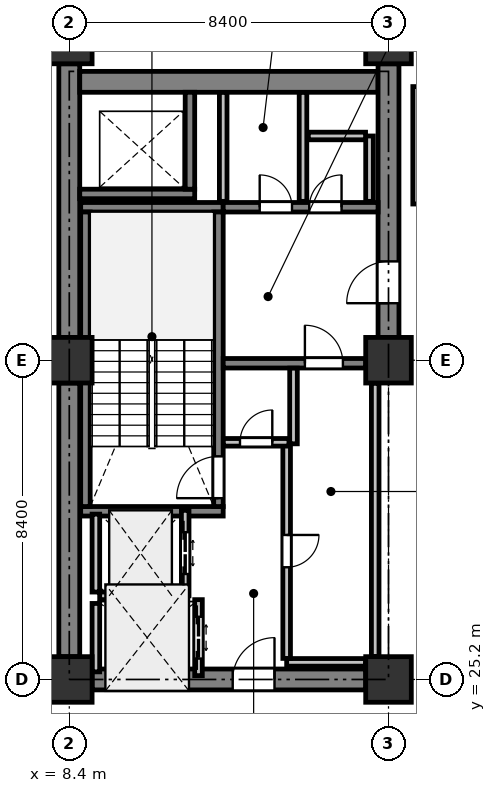
"""IFC4 building model, lengths in metres.
Left out: names, types, materials, properties, quantities, classifications, styles, units other than length and angle.
Written with IfcOpenShell. Run it as: python <this file> out.ifc"""

import sys

from ifc_helpers import new_model, si_unit, direction, frame, frame_2d, origin, origin_2d, place, context, subcontext, project, spatial, rectangle, extrude, element, fill, save


model = new_model("IFC4")
c1 = context("Model", 3, precision=1e-05, world=origin(), true_north=direction((0.0, 1.0)))
c2 = subcontext(c1, "Body", "Model", "MODEL_VIEW")
j1 = project(units=[si_unit("LENGTHUNIT", "METRE"), si_unit("PLANEANGLEUNIT", "RADIAN")], contexts=[c1])
p1 = place(None, origin())
s1 = spatial("IfcSite", under=j1, at=p1, CompositionType="ELEMENT")
p2 = place(p1, origin())
s2 = spatial("IfcBuilding", under=s1, at=p2, CompositionType="ELEMENT")
p3 = place(p2, frame((0.0, 0.0, 141.8)))
s3 = spatial("IfcBuildingStorey", under=s2, at=p3, CompositionType="ELEMENT", Elevation=141.8)
for number, where, z_axis, x_axis in (
    (1, (8.4, 25.2, 0.0), (0.0, 0.0, 1.0), (1.0, 0.0, 0.0)),
    (2, (8.4, 33.6, 0.0), (0.0, 0.0, 1.0), (1.0, 0.0, 0.0)),
    (3, (8.4, 42.0, 0.0), (0.0, 0.0, 1.0), (1.0, 0.0, 0.0)),
    (4, (16.8, 25.2, 0.0), (0.0, 0.0, 1.0), (1.0, 0.0, 0.0)),
    (5, (16.8, 33.6, 0.0), (0.0, 0.0, 1.0), (1.0, 0.0, 0.0)),
    (6, (16.8, 42.0, 0.0), (0.0, 0.0, 1.0), (1.0, 0.0, 0.0)),
):
    element("IfcColumn", number, at=place(p3, frame(where, z_axis=z_axis, x_axis=x_axis)), inside=s3, PredefinedType="COLUMN", context=c2, shape_type="SweptSolid", body=[
        extrude(rectangle(XDim=1.2, YDim=1.2, at=origin_2d()), origin(), (0.0, 0.0, 1.0), 4.1),
    ])
for number, where, z_axis, x_axis in (
    (7, (8.4, 25.8, 0.0), (0.0, 0.0, 1.0), (0.0, 1.0, 0.0)),
    (8, (8.4, 34.2, 0.0), (0.0, 0.0, 1.0), (0.0, 1.0, 0.0)),
):
    element("IfcWall", number, at=place(p3, frame(where, z_axis=z_axis, x_axis=x_axis)), inside=s3, PredefinedType="SHEAR", context=c2, shape_type="SweptSolid", body=[
        extrude(rectangle(XDim=7.2, YDim=0.55, at=frame_2d((3.6, 0.0))), origin(), (0.0, 0.0, 1.0), 3.825),
    ])
p4 = place(p3, frame((8.675, 40.925, 0.0), z_axis=(0.0, 0.0, 1.0), x_axis=(1.0, 0.0, 0.0)))
e9 = element("IfcWall", 9, at=p4, inside=s3, PredefinedType="SHEAR", context=c2, shape_type="SweptSolid", body=[
    extrude(rectangle(XDim=7.85, YDim=0.55, at=frame_2d((3.925, 0.0))), origin(), (0.0, 0.0, 1.0), 3.825),
])
p5 = place(p3, frame((16.8, 34.2, 0.0), z_axis=(0.0, 0.0, 1.0), x_axis=(0.0, 1.0, 0.0)))
e10 = element("IfcWall", 10, at=p5, inside=s3, PredefinedType="SHEAR", context=c2, shape_type="SweptSolid", body=[
    extrude(rectangle(XDim=7.2, YDim=0.55, at=frame_2d((3.6, 0.0))), origin(), (0.0, 0.0, 1.0), 3.825),
])
p6 = place(p5, frame((0.9, 0.0, 0.0)))
e11 = element("IfcOpeningElement", 11, at=p6, cuts=e10, PredefinedType="OPENING", context=c2, shape_type="SweptSolid", body=[
    extrude(rectangle(XDim=1.1, YDim=2.15, at=frame_2d((0.55, 1.075))), frame((0.0, 0.285, 0.0), z_axis=(0.0, -1.0, 0.0), x_axis=(1.0, 0.0, 0.0)), (0.0, 0.0, 1.0), 0.57),
])
p7 = place(p3, frame((9.0, 25.2, 0.0), z_axis=(0.0, 0.0, 1.0), x_axis=(1.0, 0.0, 0.0)))
e12 = element("IfcWall", 12, at=p7, inside=s3, PredefinedType="SHEAR", context=c2, shape_type="SweptSolid", body=[
    extrude(rectangle(XDim=7.2, YDim=0.55, at=frame_2d((3.6, 0.0))), origin(), (0.0, 0.0, 1.0), 3.825),
])
p8 = place(p7, frame((3.7, 0.0, 0.0)))
e13 = element("IfcOpeningElement", 13, at=p8, cuts=e12, PredefinedType="OPENING", context=c2, shape_type="SweptSolid", body=[
    extrude(rectangle(XDim=1.1, YDim=2.15, at=frame_2d((0.55, 1.075))), frame((0.0, 0.285, 0.0), z_axis=(0.0, -1.0, 0.0), x_axis=(1.0, 0.0, 0.0)), (0.0, 0.0, 1.0), 0.57),
])
for number, where, z_axis, x_axis in (
    (14, (12.45, 29.625, 0.0), (0.0, 0.0, 1.0), (-1.0, 0.0, 0.0)),
    (15, (12.45, 37.625, 0.0), (0.0, 0.0, 1.0), (-1.0, 0.0, 0.0)),
):
    element("IfcWall", number, at=place(p3, frame(where, z_axis=z_axis, x_axis=x_axis)), inside=s3, PredefinedType="SHEAR", context=c2, shape_type="SweptSolid", body=[
        extrude(rectangle(XDim=3.75, YDim=0.25, at=frame_2d((1.875, 0.0))), origin(), (0.0, 0.0, 1.0), 3.825),
    ])
p9 = place(p3, frame((12.325, 29.75, 0.0), z_axis=(0.0, 0.0, 1.0), x_axis=(0.0, 1.0, 0.0)))
e16 = element("IfcWall", 16, at=p9, inside=s3, PredefinedType="SHEAR", context=c2, shape_type="SweptSolid", body=[
    extrude(rectangle(XDim=7.75, YDim=0.25, at=frame_2d((3.875, 0.0))), origin(), (0.0, 0.0, 1.0), 3.825),
])
p10 = place(p9, frame((0.22, 0.0, 0.0)))
e17 = element("IfcOpeningElement", 17, at=p10, cuts=e16, PredefinedType="OPENING", context=c2, shape_type="SweptSolid", body=[
    extrude(rectangle(XDim=1.1, YDim=2.15, at=frame_2d((0.55, 1.075))), frame((0.0, 0.135, 0.0), z_axis=(0.0, -1.0, 0.0), x_axis=(1.0, 0.0, 0.0)), (0.0, 0.0, 1.0), 0.27),
])
p11 = place(p3, frame((8.825, 29.75, 0.0), z_axis=(0.0, 0.0, 1.0), x_axis=(0.0, 1.0, 0.0)))
e18 = element("IfcWall", 18, at=p11, inside=s3, PredefinedType="SHEAR", context=c2, shape_type="SweptSolid", body=[
    extrude(rectangle(XDim=7.75, YDim=0.25, at=frame_2d((3.875, 0.0))), origin(), (0.0, 0.0, 1.0), 3.825),
])
p12 = place(p3, frame((8.675, 37.975, 0.0), z_axis=(0.0, 0.0, 1.0), x_axis=(1.0, 0.0, 0.0)))
e19 = element("IfcWall", 19, at=p12, inside=s3, PredefinedType="SHEAR", context=c2, shape_type="SweptSolid", body=[
    extrude(rectangle(XDim=3.025, YDim=0.25, at=frame_2d((1.512, 0.0))), origin(), (0.0, 0.0, 1.0), 3.825),
])
p13 = place(p3, frame((11.575, 38.1, 0.0), z_axis=(0.0, 0.0, 1.0), x_axis=(0.0, 1.0, 0.0)))
e20 = element("IfcWall", 20, at=p13, inside=s3, PredefinedType="SHEAR", context=c2, shape_type="SweptSolid", body=[
    extrude(rectangle(XDim=2.55, YDim=0.25, at=frame_2d((1.275, 0.0))), origin(), (0.0, 0.0, 1.0), 3.825),
])
p14 = place(p3, frame((12.45, 33.52, 0.0), z_axis=(0.0, 0.0, 1.0), x_axis=(1.0, 0.0, 0.0)))
e21 = element("IfcWall", 21, at=p14, inside=s3, PredefinedType="SHEAR", context=c2, shape_type="SweptSolid", body=[
    extrude(rectangle(XDim=3.75, YDim=0.25, at=frame_2d((1.875, 0.0))), origin(), (0.0, 0.0, 1.0), 3.825),
])
p15 = place(p14, frame((2.15, 0.0, 0.0)))
e22 = element("IfcOpeningElement", 22, at=p15, cuts=e21, PredefinedType="OPENING", context=c2, shape_type="SweptSolid", body=[
    extrude(rectangle(XDim=1.0, YDim=2.15, at=frame_2d((0.5, 1.075))), frame((0.0, 0.135, 0.0), z_axis=(0.0, -1.0, 0.0), x_axis=(1.0, 0.0, 0.0)), (0.0, 0.0, 1.0), 0.27),
])
p16 = place(p3, frame((12.45, 37.625, 0.0), z_axis=(0.0, 0.0, 1.0), x_axis=(1.0, 0.0, 0.0)))
e23 = element("IfcWall", 23, at=p16, inside=s3, PredefinedType="SHEAR", context=c2, shape_type="SweptSolid", body=[
    extrude(rectangle(XDim=4.075, YDim=0.25, at=frame_2d((2.038, 0.0))), origin(), (0.0, 0.0, 1.0), 3.825),
])
p17 = place(p16, frame((0.96, 0.0, 0.0)))
e24 = element("IfcOpeningElement", 24, at=p17, cuts=e23, PredefinedType="OPENING", context=c2, shape_type="SweptSolid", body=[
    extrude(rectangle(XDim=0.85, YDim=2.15, at=frame_2d((0.425, 1.075))), frame((0.0, 0.135, 0.0), z_axis=(0.0, -1.0, 0.0), x_axis=(1.0, 0.0, 0.0)), (0.0, 0.0, 1.0), 0.27),
])
p18 = place(p16, frame((2.264, 0.0, 0.0)))
e25 = element("IfcOpeningElement", 25, at=p18, cuts=e23, PredefinedType="OPENING", context=c2, shape_type="SweptSolid", body=[
    extrude(rectangle(XDim=0.85, YDim=2.15, at=frame_2d((0.425, 1.075))), frame((0.0, 0.135, 0.0), z_axis=(0.0, -1.0, 0.0), x_axis=(1.0, 0.0, 0.0)), (0.0, 0.0, 1.0), 0.27),
])
p19 = place(p3, frame((11.45, 27.4, 0.0), z_axis=(0.0, 0.0, 1.0), x_axis=(0.0, 1.0, 0.0)))
e26 = element("IfcWall", 26, at=p19, inside=s3, PredefinedType="PARTITIONING", context=c2, shape_type="SweptSolid", body=[
    extrude(rectangle(XDim=2.25, YDim=0.2, at=frame_2d((1.125, 0.0))), origin(), (0.0, 0.0, 1.0), 3.825),
])
p20 = place(p19, frame((0.575, 0.0, 0.0)))
e27 = element("IfcOpeningElement", 27, at=p20, cuts=e26, PredefinedType="OPENING", context=c2, shape_type="SweptSolid", body=[
    extrude(rectangle(XDim=1.1, YDim=2.2, at=frame_2d((0.55, 1.1))), frame((0.0, 0.11, 0.0), z_axis=(0.0, -1.0, 0.0), x_axis=(1.0, 0.0, 0.0)), (0.0, 0.0, 1.0), 0.22),
])
p21 = place(p3, frame((9.1, 27.5, 0.0), z_axis=(0.0, 0.0, 1.0), x_axis=(0.0, 1.0, 0.0)))
e28 = element("IfcWall", 28, at=p21, inside=s3, PredefinedType="PARTITIONING", context=c2, shape_type="SweptSolid", body=[
    extrude(rectangle(XDim=2.05, YDim=0.2, at=frame_2d((1.025, 0.0))), origin(), (0.0, 0.0, 1.0), 3.825),
])
p22 = place(p3, frame((9.2, 27.4, 0.0), z_axis=(0.0, 0.0, 1.0), x_axis=(1.0, 0.0, 0.0)))
e29 = element("IfcWall", 29, at=p22, inside=s3, PredefinedType="PARTITIONING", context=c2, shape_type="SweptSolid", body=[
    extrude(rectangle(XDim=2.15, YDim=0.2, at=frame_2d((1.075, 0.0))), origin(), (0.0, 0.0, 1.0), 3.825),
])
p23 = place(p3, frame((11.8, 25.3, 0.0), z_axis=(0.0, 0.0, 1.0), x_axis=(0.0, 1.0, 0.0)))
e30 = element("IfcWall", 30, at=p23, inside=s3, PredefinedType="PARTITIONING", context=c2, shape_type="SweptSolid", body=[
    extrude(rectangle(XDim=2.0, YDim=0.2, at=frame_2d((1.0, 0.0))), origin(), (0.0, 0.0, 1.0), 3.825),
])
p24 = place(p23, frame((0.45, 0.0, 0.0)))
e31 = element("IfcOpeningElement", 31, at=p24, cuts=e30, PredefinedType="OPENING", context=c2, shape_type="SweptSolid", body=[
    extrude(rectangle(XDim=1.1, YDim=2.2, at=frame_2d((0.55, 1.1))), frame((0.0, 0.11, 0.0), z_axis=(0.0, -1.0, 0.0), x_axis=(1.0, 0.0, 0.0)), (0.0, 0.0, 1.0), 0.22),
])
p25 = place(p3, frame((9.1, 25.4, 0.0), z_axis=(0.0, 0.0, 1.0), x_axis=(0.0, 1.0, 0.0)))
e32 = element("IfcWall", 32, at=p25, inside=s3, PredefinedType="PARTITIONING", context=c2, shape_type="SweptSolid", body=[
    extrude(rectangle(XDim=1.8, YDim=0.2, at=frame_2d((0.9, 0.0))), origin(), (0.0, 0.0, 1.0), 3.825),
])
p26 = place(p3, frame((14.12, 25.65, 0.0), z_axis=(0.0, 0.0, 1.0), x_axis=(1.0, 0.0, 0.0)))
e33 = element("IfcWall", 33, at=p26, inside=s3, PredefinedType="PARTITIONING", context=c2, shape_type="SweptSolid", body=[
    extrude(rectangle(XDim=2.075, YDim=0.2, at=frame_2d((1.038, 0.0))), origin(), (0.0, 0.0, 1.0), 3.825),
])
p27 = place(p3, frame((16.45, 25.805, 0.0), z_axis=(0.0, 0.0, 1.0), x_axis=(0.0, 1.0, 0.0)))
e34 = element("IfcWall", 34, at=p27, inside=s3, PredefinedType="PARTITIONING", context=c2, shape_type="SweptSolid", body=[
    extrude(rectangle(XDim=7.19, YDim=0.2, at=frame_2d((3.595, 0.0))), origin(), (0.0, 0.0, 1.0), 3.825),
])
p28 = place(p3, frame((14.3, 33.391, 0.0), z_axis=(0.0, 0.0, 1.0), x_axis=(0.0, -1.0, 0.0)))
e35 = element("IfcWall", 35, at=p28, inside=s3, PredefinedType="PARTITIONING", context=c2, shape_type="SweptSolid", body=[
    extrude(rectangle(XDim=1.991, YDim=0.2, at=frame_2d((0.996, 0.0))), origin(), (0.0, 0.0, 1.0), 3.825),
])
p29 = place(p3, frame((14.12, 31.4, 0.0), z_axis=(0.0, 0.0, 1.0), x_axis=(0.0, -1.0, 0.0)))
e36 = element("IfcWall", 36, at=p29, inside=s3, PredefinedType="PARTITIONING", context=c2, shape_type="SweptSolid", body=[
    extrude(rectangle(XDim=5.646, YDim=0.2, at=frame_2d((2.823, 0.0))), origin(), (0.0, 0.0, 1.0), 3.825),
])
p30 = place(p29, frame((2.398, 0.0, 0.0)))
e37 = element("IfcOpeningElement", 37, at=p30, cuts=e36, PredefinedType="OPENING", context=c2, shape_type="SweptSolid", body=[
    extrude(rectangle(XDim=0.85, YDim=2.15, at=frame_2d((0.425, 1.075))), frame((0.0, 0.11, 0.0), z_axis=(0.0, -1.0, 0.0), x_axis=(1.0, 0.0, 0.0)), (0.0, 0.0, 1.0), 0.22),
])
p31 = place(p3, frame((12.454, 31.44, 0.0), z_axis=(0.0, 0.0, 1.0), x_axis=(1.0, 0.0, 0.0)))
e38 = element("IfcWall", 38, at=p31, inside=s3, PredefinedType="PARTITIONING", context=c2, shape_type="SweptSolid", body=[
    extrude(rectangle(XDim=1.726, YDim=0.2, at=frame_2d((0.863, 0.0))), origin(), (0.0, 0.0, 1.0), 3.825),
])
p32 = place(p31, frame((0.438, 0.0, 0.0)))
e39 = element("IfcOpeningElement", 39, at=p32, cuts=e38, PredefinedType="OPENING", context=c2, shape_type="SweptSolid", body=[
    extrude(rectangle(XDim=0.85, YDim=2.15, at=frame_2d((0.425, 1.075))), frame((0.0, 0.11, 0.0), z_axis=(0.0, -1.0, 0.0), x_axis=(1.0, 0.0, 0.0)), (0.0, 0.0, 1.0), 0.22),
])
for number, where, z_axis, x_axis in (
    (40, (14.55, 37.78, 0.0), (0.0, 0.0, 1.0), (0.0, 1.0, 0.0)),
    (41, (12.45, 40.646, 0.0), (0.0, 0.0, 1.0), (0.0, -1.0, 0.0)),
):
    element("IfcWall", number, at=place(p3, frame(where, z_axis=z_axis, x_axis=x_axis)), inside=s3, PredefinedType="PARTITIONING", context=c2, shape_type="SweptSolid", body=[
        extrude(rectangle(XDim=2.866, YDim=0.2, at=frame_2d((1.433, 0.0))), origin(), (0.0, 0.0, 1.0), 2.725),
    ])
p33 = place(p3, frame((16.3, 37.78, 0.0), z_axis=(0.0, 0.0, 1.0), x_axis=(0.0, 1.0, 0.0)))
e42 = element("IfcWall", 42, at=p33, inside=s3, PredefinedType="PARTITIONING", context=c2, shape_type="SweptSolid", body=[
    extrude(rectangle(XDim=1.72, YDim=0.2, at=frame_2d((0.86, 0.0))), origin(), (0.0, 0.0, 1.0), 2.725),
])
p34 = place(p3, frame((16.196, 39.5, 0.0), z_axis=(0.0, 0.0, 1.0), x_axis=(-1.0, 0.0, 0.0)))
e43 = element("IfcWall", 43, at=p34, inside=s3, PredefinedType="PARTITIONING", context=c2, shape_type="SweptSolid", body=[
    extrude(rectangle(XDim=1.506, YDim=0.2, at=frame_2d((0.753, 0.0))), origin(), (0.0, 0.0, 1.0), 2.725),
])
p35 = place(p3, frame((17.54, 37.71, 0.0), z_axis=(0.0, 0.0, 1.0), x_axis=(0.0, 1.0, 0.0)))
e44 = element("IfcWall", 44, at=p35, inside=s3, PredefinedType="PARTITIONING", context=c2, shape_type="SweptSolid", body=[
    extrude(rectangle(XDim=3.09, YDim=0.2, at=frame_2d((1.545, 0.0))), origin(), (0.0, 0.0, 1.0), 3.825),
])
p36 = place(p6, origin())
e45 = element("IfcDoor", 45, at=p36, inside=s3, OperationType="SINGLE_SWING_LEFT", PredefinedType="DOOR", context=c2, shape_type="SweptSolid", body=[
    extrude(rectangle(XDim=1.1, YDim=2.15, at=frame_2d((0.55, 1.075))), frame((0.0, 0.025, 0.0), z_axis=(0.0, -1.0, 0.0), x_axis=(1.0, 0.0, 0.0)), (0.0, 0.0, 1.0), 0.05),
])
fill(e11, e45)
p37 = place(p8, origin())
e46 = element("IfcDoor", 46, at=p37, inside=s3, OperationType="SINGLE_SWING_RIGHT", PredefinedType="DOOR", context=c2, shape_type="SweptSolid", body=[
    extrude(rectangle(XDim=1.1, YDim=2.15, at=frame_2d((0.55, 1.075))), frame((0.0, 0.025, 0.0), z_axis=(0.0, -1.0, 0.0), x_axis=(1.0, 0.0, 0.0)), (0.0, 0.0, 1.0), 0.05),
])
fill(e13, e46)
p38 = place(p10, origin())
e47 = element("IfcDoor", 47, at=p38, inside=s3, OperationType="SINGLE_SWING_LEFT", PredefinedType="DOOR", context=c2, shape_type="SweptSolid", body=[
    extrude(rectangle(XDim=1.1, YDim=2.15, at=frame_2d((0.55, 1.075))), frame((0.0, 0.025, 0.0), z_axis=(0.0, -1.0, 0.0), x_axis=(1.0, 0.0, 0.0)), (0.0, 0.0, 1.0), 0.05),
])
fill(e17, e47)
p39 = place(p15, origin())
e48 = element("IfcDoor", 48, at=p39, inside=s3, OperationType="SINGLE_SWING_LEFT", PredefinedType="DOOR", context=c2, shape_type="SweptSolid", body=[
    extrude(rectangle(XDim=1.0, YDim=2.15, at=frame_2d((0.5, 1.075))), frame((0.0, 0.025, 0.0), z_axis=(0.0, -1.0, 0.0), x_axis=(1.0, 0.0, 0.0)), (0.0, 0.0, 1.0), 0.05),
])
fill(e22, e48)
p40 = place(p20, origin())
e49 = element("IfcDoor", 49, at=p40, inside=s3, OperationType="DOUBLE_DOOR_SLIDING", PredefinedType="DOOR", context=c2, shape_type="SweptSolid", body=[
    extrude(rectangle(XDim=1.1, YDim=2.2, at=frame_2d((0.55, 1.1))), frame((0.0, 0.025, 0.0), z_axis=(0.0, -1.0, 0.0), x_axis=(1.0, 0.0, 0.0)), (0.0, 0.0, 1.0), 0.05),
])
fill(e27, e49)
p41 = place(p24, origin())
e50 = element("IfcDoor", 50, at=p41, inside=s3, OperationType="DOUBLE_DOOR_SLIDING", PredefinedType="DOOR", context=c2, shape_type="SweptSolid", body=[
    extrude(rectangle(XDim=1.1, YDim=2.2, at=frame_2d((0.55, 1.1))), frame((0.0, 0.025, 0.0), z_axis=(0.0, -1.0, 0.0), x_axis=(1.0, 0.0, 0.0)), (0.0, 0.0, 1.0), 0.05),
])
fill(e31, e50)
p42 = place(p30, origin())
e51 = element("IfcDoor", 51, at=p42, inside=s3, OperationType="SINGLE_SWING_LEFT", PredefinedType="DOOR", context=c2, shape_type="SweptSolid", body=[
    extrude(rectangle(XDim=0.85, YDim=2.15, at=frame_2d((0.425, 1.075))), frame((0.0, 0.025, 0.0), z_axis=(0.0, -1.0, 0.0), x_axis=(1.0, 0.0, 0.0)), (0.0, 0.0, 1.0), 0.05),
])
fill(e37, e51)
p43 = place(p32, origin())
e52 = element("IfcDoor", 52, at=p43, inside=s3, OperationType="SINGLE_SWING_RIGHT", PredefinedType="DOOR", context=c2, shape_type="SweptSolid", body=[
    extrude(rectangle(XDim=0.85, YDim=2.15, at=frame_2d((0.425, 1.075))), frame((0.0, 0.025, 0.0), z_axis=(0.0, -1.0, 0.0), x_axis=(1.0, 0.0, 0.0)), (0.0, 0.0, 1.0), 0.05),
])
fill(e39, e52)
p44 = place(p17, origin())
e53 = element("IfcDoor", 53, at=p44, inside=s3, OperationType="SINGLE_SWING_LEFT", PredefinedType="DOOR", context=c2, shape_type="SweptSolid", body=[
    extrude(rectangle(XDim=0.85, YDim=2.15, at=frame_2d((0.425, 1.075))), frame((0.0, 0.025, 0.0), z_axis=(0.0, -1.0, 0.0), x_axis=(1.0, 0.0, 0.0)), (0.0, 0.0, 1.0), 0.05),
])
fill(e24, e53)
p45 = place(p18, origin())
e54 = element("IfcDoor", 54, at=p45, inside=s3, OperationType="SINGLE_SWING_RIGHT", PredefinedType="DOOR", context=c2, shape_type="SweptSolid", body=[
    extrude(rectangle(XDim=0.85, YDim=2.15, at=frame_2d((0.425, 1.075))), frame((0.0, 0.025, 0.0), z_axis=(0.0, -1.0, 0.0), x_axis=(1.0, 0.0, 0.0)), (0.0, 0.0, 1.0), 0.05),
])
fill(e25, e54)
save(model, sys.argv[1])
